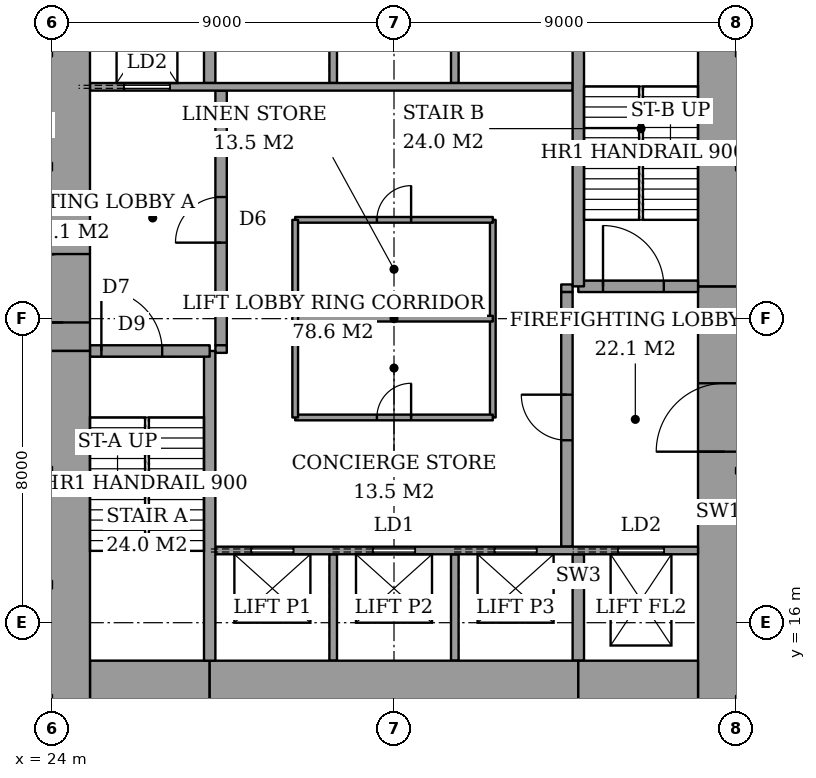
"""IFC4 building model, lengths in metres.
Left out: names, types, materials, properties, quantities, classifications, styles, units other than length and angle.
Written with IfcOpenShell. Run it as: python <this file> out.ifc"""

import sys

from ifc_helpers import new_model, si_unit, direction, frame, frame_2d, origin, place, context, subcontext, project, spatial, rectangle, extrude, element, fill, save


model = new_model("IFC4")
c1 = context("Model", 3, precision=1e-05, world=origin(), true_north=direction((0.0, 1.0)))
c2 = subcontext(c1, "Body", "Model", "MODEL_VIEW")
j1 = project(units=[si_unit("LENGTHUNIT", "METRE"), si_unit("PLANEANGLEUNIT", "RADIAN")], contexts=[c1])
p1 = place(None, origin())
s1 = spatial("IfcSite", under=j1, at=p1, CompositionType="ELEMENT")
p2 = place(p1, origin())
s2 = spatial("IfcBuilding", under=s1, at=p2, CompositionType="ELEMENT")
p3 = place(p2, frame((0.0, 0.0, 6.0)))
s3 = spatial("IfcBuildingStorey", under=s2, at=p3, CompositionType="ELEMENT", Elevation=6.0)
p4 = place(p3, frame((25.0, 14.0, 0.0), z_axis=(0.0, 0.0, 1.0), x_axis=(1.0, 0.0, 0.0)))
e1 = element("IfcWall", 1, at=p4, inside=s3, PredefinedType="SHEAR", context=c2, shape_type="SweptSolid", body=[
    extrude(rectangle(XDim=3.15, YDim=2.0, at=frame_2d((1.575, 0.0))), origin(), (0.0, 0.0, 1.0), 5.0),
])
p5 = place(p3, frame((28.15, 14.0, 0.0), z_axis=(0.0, 0.0, 1.0), x_axis=(1.0, 0.0, 0.0)))
e2 = element("IfcWall", 2, at=p5, inside=s3, PredefinedType="SHEAR", context=c2, shape_type="SweptSolid", body=[
    extrude(rectangle(XDim=9.7, YDim=2.0, at=frame_2d((4.85, 0.0))), origin(), (0.0, 0.0, 1.0), 5.0),
])
p6 = place(p3, frame((37.85, 14.0, 0.0), z_axis=(0.0, 0.0, 1.0), x_axis=(1.0, 0.0, 0.0)))
e3 = element("IfcWall", 3, at=p6, inside=s3, PredefinedType="SHEAR", context=c2, shape_type="SweptSolid", body=[
    extrude(rectangle(XDim=3.15, YDim=2.0, at=frame_2d((1.575, 0.0))), origin(), (0.0, 0.0, 1.0), 5.0),
])
p7 = place(p3, frame((24.3, 13.0, 0.0), z_axis=(0.0, 0.0, 1.0), x_axis=(0.0, 1.0, 0.0)))
e4 = element("IfcWall", 4, at=p7, inside=s3, PredefinedType="SHEAR", context=c2, shape_type="SweptSolid", body=[
    extrude(rectangle(XDim=10.15, YDim=1.4, at=frame_2d((5.075, 0.0))), origin(), (0.0, 0.0, 1.0), 5.0),
])
p8 = place(p3, frame((24.3, 23.15, 0.0), z_axis=(0.0, 0.0, 1.0), x_axis=(0.0, 1.0, 0.0)))
e5 = element("IfcWall", 5, at=p8, inside=s3, PredefinedType="SHEAR", context=c2, shape_type="SweptSolid", body=[
    extrude(rectangle(XDim=11.85, YDim=1.4, at=frame_2d((5.925, 0.0))), origin(), (0.0, 0.0, 1.0), 5.0),
])
p9 = place(p8, frame((0.75, 0.0, 0.0)))
e6 = element("IfcOpeningElement", 6, at=p9, cuts=e5, PredefinedType="OPENING", context=c2, shape_type="SweptSolid", body=[
    extrude(rectangle(XDim=1.8, YDim=2.4, at=frame_2d((0.9, 1.2))), frame((0.0, 0.71, 0.0), z_axis=(0.0, -1.0, 0.0), x_axis=(1.0, 0.0, 0.0)), (0.0, 0.0, 1.0), 1.42),
])
p10 = place(p3, frame((41.7, 13.0, 0.0), z_axis=(0.0, 0.0, 1.0), x_axis=(0.0, 1.0, 0.0)))
e7 = element("IfcWall", 7, at=p10, inside=s3, PredefinedType="SHEAR", context=c2, shape_type="SweptSolid", body=[
    extrude(rectangle(XDim=11.85, YDim=1.4, at=frame_2d((5.925, 0.0))), origin(), (0.0, 0.0, 1.0), 5.0),
])
p11 = place(p10, frame((7.5, 0.0, 0.0)))
e8 = element("IfcOpeningElement", 8, at=p11, cuts=e7, PredefinedType="OPENING", context=c2, shape_type="SweptSolid", body=[
    extrude(rectangle(XDim=1.8, YDim=2.4, at=frame_2d((0.9, 1.2))), frame((0.0, 0.71, 0.0), z_axis=(0.0, -1.0, 0.0), x_axis=(1.0, 0.0, 0.0)), (0.0, 0.0, 1.0), 1.42),
])
p12 = place(p3, frame((41.7, 24.85, 0.0), z_axis=(0.0, 0.0, 1.0), x_axis=(0.0, 1.0, 0.0)))
e9 = element("IfcWall", 9, at=p12, inside=s3, PredefinedType="SHEAR", context=c2, shape_type="SweptSolid", body=[
    extrude(rectangle(XDim=10.15, YDim=1.4, at=frame_2d((5.075, 0.0))), origin(), (0.0, 0.0, 1.0), 5.0),
])
p13 = place(p3, frame((28.15, 15.0, 0.0), z_axis=(0.0, 0.0, 1.0), x_axis=(0.0, 1.0, 0.0)))
e10 = element("IfcWall", 10, at=p13, inside=s3, PredefinedType="SHEAR", context=c2, shape_type="SweptSolid", body=[
    extrude(rectangle(XDim=8.15, YDim=0.3, at=frame_2d((4.075, 0.0))), origin(), (0.0, 0.0, 1.0), 5.0),
])
p14 = place(p3, frame((25.0, 23.15, 0.0), z_axis=(0.0, 0.0, 1.0), x_axis=(1.0, 0.0, 0.0)))
e11 = element("IfcWall", 11, at=p14, inside=s3, PredefinedType="SHEAR", context=c2, shape_type="SweptSolid", body=[
    extrude(rectangle(XDim=3.15, YDim=0.3, at=frame_2d((1.575, 0.0))), origin(), (0.0, 0.0, 1.0), 5.0),
])
p15 = place(p14, frame((0.3, 0.0, 0.0)))
e12 = element("IfcOpeningElement", 12, at=p15, cuts=e11, PredefinedType="OPENING", context=c2, shape_type="SweptSolid", body=[
    extrude(rectangle(XDim=1.6, YDim=2.1, at=frame_2d((0.8, 1.05))), frame((0.0, 0.16, 0.0), z_axis=(0.0, -1.0, 0.0), x_axis=(1.0, 0.0, 0.0)), (0.0, 0.0, 1.0), 0.32),
])
p16 = place(p3, frame((37.85, 24.85, 0.0), z_axis=(0.0, 0.0, 1.0), x_axis=(0.0, 1.0, 0.0)))
e13 = element("IfcWall", 13, at=p16, inside=s3, PredefinedType="SHEAR", context=c2, shape_type="SweptSolid", body=[
    extrude(rectangle(XDim=8.15, YDim=0.3, at=frame_2d((4.075, 0.0))), origin(), (0.0, 0.0, 1.0), 5.0),
])
p17 = place(p3, frame((37.85, 24.85, 0.0), z_axis=(0.0, 0.0, 1.0), x_axis=(1.0, 0.0, 0.0)))
e14 = element("IfcWall", 14, at=p17, inside=s3, PredefinedType="SHEAR", context=c2, shape_type="SweptSolid", body=[
    extrude(rectangle(XDim=3.15, YDim=0.3, at=frame_2d((1.575, 0.0))), origin(), (0.0, 0.0, 1.0), 5.0),
])
p18 = place(p17, frame((0.65, 0.0, 0.0)))
e15 = element("IfcOpeningElement", 15, at=p18, cuts=e14, PredefinedType="OPENING", context=c2, shape_type="SweptSolid", body=[
    extrude(rectangle(XDim=1.6, YDim=2.1, at=frame_2d((0.8, 1.05))), frame((0.0, 0.16, 0.0), z_axis=(0.0, -1.0, 0.0), x_axis=(1.0, 0.0, 0.0)), (0.0, 0.0, 1.0), 0.32),
])
p19 = place(p3, frame((28.45, 23.3, 0.0), z_axis=(0.0, 0.0, 1.0), x_axis=(0.0, 1.0, 0.0)))
e16 = element("IfcWall", 16, at=p19, inside=s3, PredefinedType="PARTITIONING", context=c2, shape_type="SweptSolid", body=[
    extrude(rectangle(XDim=6.7, YDim=0.3, at=frame_2d((3.35, 0.0))), origin(), (0.0, 0.0, 1.0), 5.0),
])
p20 = place(p19, frame((2.7, 0.0, 0.0)))
e17 = element("IfcOpeningElement", 17, at=p20, cuts=e16, PredefinedType="OPENING", context=c2, shape_type="SweptSolid", body=[
    extrude(rectangle(XDim=1.2, YDim=2.1, at=frame_2d((0.6, 1.05))), frame((0.0, 0.16, 0.0), z_axis=(0.0, -1.0, 0.0), x_axis=(1.0, 0.0, 0.0)), (0.0, 0.0, 1.0), 0.32),
])
p21 = place(p3, frame((37.55, 18.0, 0.0), z_axis=(0.0, 0.0, 1.0), x_axis=(0.0, 1.0, 0.0)))
e18 = element("IfcWall", 18, at=p21, inside=s3, PredefinedType="PARTITIONING", context=c2, shape_type="SweptSolid", body=[
    extrude(rectangle(XDim=6.7, YDim=0.3, at=frame_2d((3.35, 0.0))), origin(), (0.0, 0.0, 1.0), 5.0),
])
p22 = place(p21, frame((2.8, 0.0, 0.0)))
e19 = element("IfcOpeningElement", 19, at=p22, cuts=e18, PredefinedType="OPENING", context=c2, shape_type="SweptSolid", body=[
    extrude(rectangle(XDim=1.2, YDim=2.1, at=frame_2d((0.6, 1.05))), frame((0.0, 0.16, 0.0), z_axis=(0.0, -1.0, 0.0), x_axis=(1.0, 0.0, 0.0)), (0.0, 0.0, 1.0), 0.32),
])
p23 = place(p3, frame((28.3, 17.9, 0.0), z_axis=(0.0, 0.0, 1.0), x_axis=(1.0, 0.0, 0.0)))
e20 = element("IfcWall", 20, at=p23, inside=s3, PredefinedType="PARTITIONING", context=c2, shape_type="SweptSolid", body=[
    extrude(rectangle(XDim=12.7, YDim=0.2, at=frame_2d((6.35, 0.0))), origin(), (0.0, 0.0, 1.0), 5.0),
])
p24 = place(p23, frame((0.95, 0.0, 0.0)))
e21 = element("IfcOpeningElement", 21, at=p24, cuts=e20, PredefinedType="OPENING", context=c2, shape_type="SweptSolid", body=[
    extrude(rectangle(XDim=1.1, YDim=2.1, at=frame_2d((0.55, 1.05))), frame((0.0, 0.11, 0.0), z_axis=(0.0, -1.0, 0.0), x_axis=(1.0, 0.0, 0.0)), (0.0, 0.0, 1.0), 0.22),
])
p25 = place(p23, frame((4.15, 0.0, 0.0)))
e22 = element("IfcOpeningElement", 22, at=p25, cuts=e20, PredefinedType="OPENING", context=c2, shape_type="SweptSolid", body=[
    extrude(rectangle(XDim=1.1, YDim=2.1, at=frame_2d((0.55, 1.05))), frame((0.0, 0.11, 0.0), z_axis=(0.0, -1.0, 0.0), x_axis=(1.0, 0.0, 0.0)), (0.0, 0.0, 1.0), 0.22),
])
p26 = place(p23, frame((7.35, 0.0, 0.0)))
e23 = element("IfcOpeningElement", 23, at=p26, cuts=e20, PredefinedType="OPENING", context=c2, shape_type="SweptSolid", body=[
    extrude(rectangle(XDim=1.1, YDim=2.1, at=frame_2d((0.55, 1.05))), frame((0.0, 0.11, 0.0), z_axis=(0.0, -1.0, 0.0), x_axis=(1.0, 0.0, 0.0)), (0.0, 0.0, 1.0), 0.22),
])
p27 = place(p23, frame((10.6, 0.0, 0.0)))
e24 = element("IfcOpeningElement", 24, at=p27, cuts=e20, PredefinedType="OPENING", context=c2, shape_type="SweptSolid", body=[
    extrude(rectangle(XDim=1.2, YDim=2.1, at=frame_2d((0.6, 1.05))), frame((0.0, 0.11, 0.0), z_axis=(0.0, -1.0, 0.0), x_axis=(1.0, 0.0, 0.0)), (0.0, 0.0, 1.0), 0.22),
])
p28 = place(p3, frame((25.0, 30.1, 0.0), z_axis=(0.0, 0.0, 1.0), x_axis=(1.0, 0.0, 0.0)))
e25 = element("IfcWall", 25, at=p28, inside=s3, PredefinedType="PARTITIONING", context=c2, shape_type="SweptSolid", body=[
    extrude(rectangle(XDim=12.7, YDim=0.2, at=frame_2d((6.35, 0.0))), origin(), (0.0, 0.0, 1.0), 5.0),
])
p29 = place(p28, frame((0.9, 0.0, 0.0)))
e26 = element("IfcOpeningElement", 26, at=p29, cuts=e25, PredefinedType="OPENING", context=c2, shape_type="SweptSolid", body=[
    extrude(rectangle(XDim=1.2, YDim=2.1, at=frame_2d((0.6, 1.05))), frame((0.0, 0.11, 0.0), z_axis=(0.0, -1.0, 0.0), x_axis=(1.0, 0.0, 0.0)), (0.0, 0.0, 1.0), 0.22),
])
for number, where, z_axis, x_axis in (
    (27, (31.4, 15.0, 0.0), (0.0, 0.0, 1.0), (0.0, 1.0, 0.0)),
    (28, (34.6, 15.0, 0.0), (0.0, 0.0, 1.0), (0.0, 1.0, 0.0)),
):
    element("IfcWall", number, at=place(p3, frame(where, z_axis=z_axis, x_axis=x_axis)), inside=s3, PredefinedType="PARTITIONING", context=c2, shape_type="SweptSolid", body=[
        extrude(rectangle(XDim=2.8, YDim=0.2, at=frame_2d((1.4, 0.0))), origin(), (0.0, 0.0, 1.0), 5.0),
    ])
p30 = place(p3, frame((37.85, 15.0, 0.0), z_axis=(0.0, 0.0, 1.0), x_axis=(0.0, 1.0, 0.0)))
e29 = element("IfcWall", 29, at=p30, inside=s3, PredefinedType="SHEAR", context=c2, shape_type="SweptSolid", body=[
    extrude(rectangle(XDim=2.8, YDim=0.3, at=frame_2d((1.4, 0.0))), origin(), (0.0, 0.0, 1.0), 5.0),
])
for number, where, z_axis, x_axis in (
    (30, (31.4, 30.2, 0.0), (0.0, 0.0, 1.0), (0.0, 1.0, 0.0)),
    (31, (34.6, 30.2, 0.0), (0.0, 0.0, 1.0), (0.0, 1.0, 0.0)),
):
    element("IfcWall", number, at=place(p3, frame(where, z_axis=z_axis, x_axis=x_axis)), inside=s3, PredefinedType="PARTITIONING", context=c2, shape_type="SweptSolid", body=[
        extrude(rectangle(XDim=2.8, YDim=0.2, at=frame_2d((1.4, 0.0))), origin(), (0.0, 0.0, 1.0), 5.0),
    ])
p31 = place(p3, frame((28.15, 30.2, 0.0), z_axis=(0.0, 0.0, 1.0), x_axis=(0.0, 1.0, 0.0)))
e32 = element("IfcWall", 32, at=p31, inside=s3, PredefinedType="SHEAR", context=c2, shape_type="SweptSolid", body=[
    extrude(rectangle(XDim=2.8, YDim=0.3, at=frame_2d((1.4, 0.0))), origin(), (0.0, 0.0, 1.0), 5.0),
])
for number, where, z_axis, x_axis in (
    (33, (28.3, 23.2, 0.0), (0.0, 0.0, 1.0), (1.0, 0.0, 0.0)),
    (34, (37.4, 24.8, 0.0), (0.0, 0.0, 1.0), (1.0, 0.0, 0.0)),
):
    element("IfcWall", number, at=place(p3, frame(where, z_axis=z_axis, x_axis=x_axis)), inside=s3, PredefinedType="PARTITIONING", context=c2, shape_type="SweptSolid", body=[
        extrude(rectangle(XDim=0.3, YDim=0.2, at=frame_2d((0.15, 0.0))), origin(), (0.0, 0.0, 1.0), 5.0),
    ])
p32 = place(p3, frame((30.4, 21.4, 0.0), z_axis=(0.0, 0.0, 1.0), x_axis=(1.0, 0.0, 0.0)))
e35 = element("IfcWall", 35, at=p32, inside=s3, PredefinedType="PARTITIONING", context=c2, shape_type="SweptSolid", body=[
    extrude(rectangle(XDim=5.2, YDim=0.15, at=frame_2d((2.6, 0.0))), origin(), (0.0, 0.0, 1.0), 4.7),
])
p33 = place(p32, frame((2.15, 0.0, 0.0)))
e36 = element("IfcOpeningElement", 36, at=p33, cuts=e35, PredefinedType="OPENING", context=c2, shape_type="SweptSolid", body=[
    extrude(rectangle(XDim=0.9, YDim=2.1, at=frame_2d((0.45, 1.05))), frame((0.0, 0.085, 0.0), z_axis=(0.0, -1.0, 0.0), x_axis=(1.0, 0.0, 0.0)), (0.0, 0.0, 1.0), 0.17),
])
p34 = place(p3, frame((30.4, 26.6, 0.0), z_axis=(0.0, 0.0, 1.0), x_axis=(1.0, 0.0, 0.0)))
e37 = element("IfcWall", 37, at=p34, inside=s3, PredefinedType="PARTITIONING", context=c2, shape_type="SweptSolid", body=[
    extrude(rectangle(XDim=5.2, YDim=0.15, at=frame_2d((2.6, 0.0))), origin(), (0.0, 0.0, 1.0), 4.7),
])
p35 = place(p34, frame((2.15, 0.0, 0.0)))
e38 = element("IfcOpeningElement", 38, at=p35, cuts=e37, PredefinedType="OPENING", context=c2, shape_type="SweptSolid", body=[
    extrude(rectangle(XDim=0.9, YDim=2.1, at=frame_2d((0.45, 1.05))), frame((0.0, 0.085, 0.0), z_axis=(0.0, -1.0, 0.0), x_axis=(1.0, 0.0, 0.0)), (0.0, 0.0, 1.0), 0.17),
])
for number, where, z_axis, x_axis in (
    (39, (30.4, 21.4, 0.0), (0.0, 0.0, 1.0), (0.0, 1.0, 0.0)),
    (40, (35.6, 21.4, 0.0), (0.0, 0.0, 1.0), (0.0, 1.0, 0.0)),
    (41, (30.4, 24.0, 0.0), (0.0, 0.0, 1.0), (1.0, 0.0, 0.0)),
):
    element("IfcWall", number, at=place(p3, frame(where, z_axis=z_axis, x_axis=x_axis)), inside=s3, PredefinedType="PARTITIONING", context=c2, shape_type="SweptSolid", body=[
        extrude(rectangle(XDim=5.2, YDim=0.15, at=frame_2d((2.6, 0.0))), origin(), (0.0, 0.0, 1.0), 4.7),
    ])
p36 = place(p15, origin())
e42 = element("IfcDoor", 42, at=p36, inside=s3, OperationType="DOUBLE_DOOR_SINGLE_SWING", PredefinedType="DOOR", context=c2, shape_type="SweptSolid", body=[
    extrude(rectangle(XDim=1.6, YDim=2.1, at=frame_2d((0.8, 1.05))), frame((0.0, 0.025, 0.0), z_axis=(0.0, -1.0, 0.0), x_axis=(1.0, 0.0, 0.0)), (0.0, 0.0, 1.0), 0.05),
])
fill(e12, e42)
p37 = place(p18, origin())
e43 = element("IfcDoor", 43, at=p37, inside=s3, OperationType="DOUBLE_DOOR_SINGLE_SWING", PredefinedType="DOOR", context=c2, shape_type="SweptSolid", body=[
    extrude(rectangle(XDim=1.6, YDim=2.1, at=frame_2d((0.8, 1.05))), frame((0.0, 0.025, 0.0), z_axis=(0.0, -1.0, 0.0), x_axis=(1.0, 0.0, 0.0)), (0.0, 0.0, 1.0), 0.05),
])
fill(e15, e43)
p38 = place(p20, origin())
e44 = element("IfcDoor", 44, at=p38, inside=s3, OperationType="SINGLE_SWING_RIGHT", PredefinedType="DOOR", context=c2, shape_type="SweptSolid", body=[
    extrude(rectangle(XDim=1.2, YDim=2.1, at=frame_2d((0.6, 1.05))), frame((0.0, 0.025, 0.0), z_axis=(0.0, -1.0, 0.0), x_axis=(1.0, 0.0, 0.0)), (0.0, 0.0, 1.0), 0.05),
])
fill(e17, e44)
p39 = place(p22, origin())
e45 = element("IfcDoor", 45, at=p39, inside=s3, OperationType="SINGLE_SWING_LEFT", PredefinedType="DOOR", context=c2, shape_type="SweptSolid", body=[
    extrude(rectangle(XDim=1.2, YDim=2.1, at=frame_2d((0.6, 1.05))), frame((0.0, 0.025, 0.0), z_axis=(0.0, -1.0, 0.0), x_axis=(1.0, 0.0, 0.0)), (0.0, 0.0, 1.0), 0.05),
])
fill(e19, e45)
p40 = place(p9, origin())
e46 = element("IfcDoor", 46, at=p40, inside=s3, OperationType="DOUBLE_DOOR_DOUBLE_SWING", PredefinedType="DOOR", context=c2, shape_type="SweptSolid", body=[
    extrude(rectangle(XDim=1.8, YDim=2.4, at=frame_2d((0.9, 1.2))), frame((0.0, 0.025, 0.0), z_axis=(0.0, -1.0, 0.0), x_axis=(1.0, 0.0, 0.0)), (0.0, 0.0, 1.0), 0.05),
])
fill(e6, e46)
p41 = place(p11, origin())
e47 = element("IfcDoor", 47, at=p41, inside=s3, OperationType="DOUBLE_DOOR_DOUBLE_SWING", PredefinedType="DOOR", context=c2, shape_type="SweptSolid", body=[
    extrude(rectangle(XDim=1.8, YDim=2.4, at=frame_2d((0.9, 1.2))), frame((0.0, 0.025, 0.0), z_axis=(0.0, -1.0, 0.0), x_axis=(1.0, 0.0, 0.0)), (0.0, 0.0, 1.0), 0.05),
])
fill(e8, e47)
p42 = place(p33, origin())
e48 = element("IfcDoor", 48, at=p42, inside=s3, OperationType="SINGLE_SWING_LEFT", PredefinedType="DOOR", context=c2, shape_type="SweptSolid", body=[
    extrude(rectangle(XDim=0.9, YDim=2.1, at=frame_2d((0.45, 1.05))), frame((0.0, 0.025, 0.0), z_axis=(0.0, -1.0, 0.0), x_axis=(1.0, 0.0, 0.0)), (0.0, 0.0, 1.0), 0.05),
])
fill(e36, e48)
p43 = place(p35, origin())
e49 = element("IfcDoor", 49, at=p43, inside=s3, OperationType="SINGLE_SWING_LEFT", PredefinedType="DOOR", context=c2, shape_type="SweptSolid", body=[
    extrude(rectangle(XDim=0.9, YDim=2.1, at=frame_2d((0.45, 1.05))), frame((0.0, 0.025, 0.0), z_axis=(0.0, -1.0, 0.0), x_axis=(1.0, 0.0, 0.0)), (0.0, 0.0, 1.0), 0.05),
])
fill(e38, e49)
p44 = place(p24, origin())
e50 = element("IfcDoor", 50, at=p44, inside=s3, OperationType="SLIDING_TO_LEFT", PredefinedType="DOOR", context=c2, shape_type="SweptSolid", body=[
    extrude(rectangle(XDim=1.1, YDim=2.1, at=frame_2d((0.55, 1.05))), frame((0.0, 0.025, 0.0), z_axis=(0.0, -1.0, 0.0), x_axis=(1.0, 0.0, 0.0)), (0.0, 0.0, 1.0), 0.05),
])
fill(e21, e50)
p45 = place(p25, origin())
e51 = element("IfcDoor", 51, at=p45, inside=s3, OperationType="SLIDING_TO_LEFT", PredefinedType="DOOR", context=c2, shape_type="SweptSolid", body=[
    extrude(rectangle(XDim=1.1, YDim=2.1, at=frame_2d((0.55, 1.05))), frame((0.0, 0.025, 0.0), z_axis=(0.0, -1.0, 0.0), x_axis=(1.0, 0.0, 0.0)), (0.0, 0.0, 1.0), 0.05),
])
fill(e22, e51)
p46 = place(p26, origin())
e52 = element("IfcDoor", 52, at=p46, inside=s3, OperationType="SLIDING_TO_LEFT", PredefinedType="DOOR", context=c2, shape_type="SweptSolid", body=[
    extrude(rectangle(XDim=1.1, YDim=2.1, at=frame_2d((0.55, 1.05))), frame((0.0, 0.025, 0.0), z_axis=(0.0, -1.0, 0.0), x_axis=(1.0, 0.0, 0.0)), (0.0, 0.0, 1.0), 0.05),
])
fill(e23, e52)
p47 = place(p29, origin())
e53 = element("IfcDoor", 53, at=p47, inside=s3, OperationType="SLIDING_TO_LEFT", PredefinedType="DOOR", context=c2, shape_type="SweptSolid", body=[
    extrude(rectangle(XDim=1.2, YDim=2.1, at=frame_2d((0.6, 1.05))), frame((0.0, 0.025, 0.0), z_axis=(0.0, -1.0, 0.0), x_axis=(1.0, 0.0, 0.0)), (0.0, 0.0, 1.0), 0.05),
])
fill(e26, e53)
p48 = place(p27, origin())
e54 = element("IfcDoor", 54, at=p48, inside=s3, OperationType="SLIDING_TO_LEFT", PredefinedType="DOOR", context=c2, shape_type="SweptSolid", body=[
    extrude(rectangle(XDim=1.2, YDim=2.1, at=frame_2d((0.6, 1.05))), frame((0.0, 0.025, 0.0), z_axis=(0.0, -1.0, 0.0), x_axis=(1.0, 0.0, 0.0)), (0.0, 0.0, 1.0), 0.05),
])
fill(e24, e54)
save(model, sys.argv[1])
